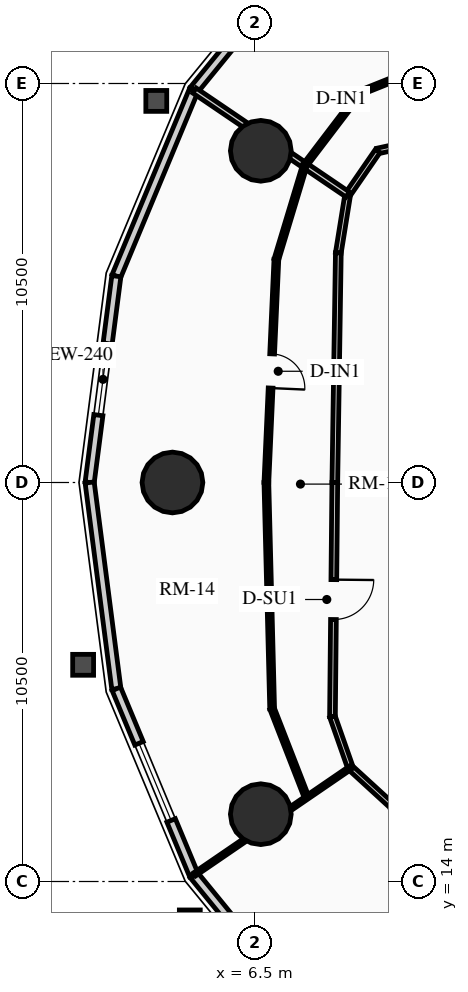
"""IFC4 building model, lengths in metres.
Left out: names, types, materials, properties, quantities, classifications, styles, units other than length and angle.
Written with IfcOpenShell. Run it as: python <this file> out.ifc"""

import sys

from ifc_helpers import new_model, si_unit, direction, frame, frame_2d, origin, origin_2d, place, context, subcontext, project, spatial, rectangle, circle, extrude, source, transform, mapped, element, fill, save


model = new_model("IFC4")
c1 = context("Model", 3, precision=1e-05, world=origin(), true_north=direction((0.0, 1.0)))
c2 = subcontext(c1, "Body", "Model", "MODEL_VIEW")
j1 = project(units=[si_unit("LENGTHUNIT", "METRE"), si_unit("PLANEANGLEUNIT", "RADIAN")], contexts=[c1])
p1 = place(None, origin())
s1 = spatial("IfcSite", under=j1, at=p1, CompositionType="ELEMENT")
p2 = place(p1, origin())
s2 = spatial("IfcBuilding", under=s1, at=p2, CompositionType="ELEMENT")
p3 = place(p2, frame((0.0, 0.0, 27.82)))
s3 = spatial("IfcBuildingStorey", under=s2, at=p3, CompositionType="ELEMENT", Elevation=27.82)
for number, where, z_axis, x_axis in (
    (1, (6.653, 33.229, 0.0), (0.0, 0.0, 1.0), (1.0, 0.0, 0.0)),
    (2, (4.328, 24.5, 0.0), (0.0, 0.0, 1.0), (1.0, 0.0, 0.0)),
    (3, (6.653, 15.771, 0.0), (0.0, 0.0, 1.0), (1.0, 0.0, 0.0)),
):
    element("IfcColumn", number, at=place(p3, frame(where, z_axis=z_axis, x_axis=x_axis)), inside=s3, PredefinedType="USERDEFINED", context=c2, shape_type="SweptSolid", body=[
        extrude(circle(Radius=0.8, at=origin_2d()), origin(), (0.0, 0.0, 1.0), 2.91),
    ])
p4 = place(p3, frame((4.89, 34.827, 0.0), z_axis=(0.0, 0.0, 1.0), x_axis=(0.632588557044, 0.774488035735, 0.0)))
e4 = element("IfcWall", 4, at=p4, inside=s3, PredefinedType="SOLIDWALL", context=c2, shape_type="SweptSolid", body=[
    extrude(rectangle(XDim=5.019, YDim=0.24, at=frame_2d((2.509, 0.0))), origin(), (0.0, 0.0, 1.0), 2.635),
])
m1 = source(origin(), c2, "Body", "SweptSolid", [
    extrude(rectangle(XDim=1.9, YDim=1.35, at=frame_2d((0.95, 0.675))), frame((0.0, 0.13, 0.0), z_axis=(0.0, -1.0, 0.0), x_axis=(1.0, 0.0, 0.0)), (0.0, 0.0, 1.0), 0.26),
])
p5 = place(p4, frame((1.559, 0.0, 0.65)))
e5 = element("IfcOpeningElement", 5, at=p5, cuts=e4, PredefinedType="OPENING", context=c2, shape_type="MappedRepresentation", body=[
    mapped(m1, transform((0.0, 0.0, 0.0), x_axis=(1.0, 0.0, 0.0), y_axis=(0.0, 1.0, 0.0), z_axis=(0.0, 0.0, 1.0), scale=1.0)),
])
p6 = place(p3, frame((2.851, 29.929, 0.0), z_axis=(0.0, 0.0, 1.0), x_axis=(0.384255919668, 0.923226618009, 0.0)))
e6 = element("IfcWall", 6, at=p6, inside=s3, PredefinedType="SOLIDWALL", context=c2, shape_type="SweptSolid", body=[
    extrude(rectangle(XDim=5.305, YDim=0.24, at=frame_2d((2.653, 0.0))), origin(), (0.0, 0.0, 1.0), 2.635),
])
p7 = place(p3, frame((2.149, 24.5, 0.0), z_axis=(0.0, 0.0, 1.0), x_axis=(0.128298189174, 0.991735637483, 0.0)))
e7 = element("IfcWall", 7, at=p7, inside=s3, PredefinedType="SOLIDWALL", context=c2, shape_type="SweptSolid", body=[
    extrude(rectangle(XDim=5.475, YDim=0.24, at=frame_2d((2.737, 0.0))), origin(), (0.0, 0.0, 1.0), 2.073),
])
p8 = place(p7, frame((1.787, 0.0, 0.65)))
e8 = element("IfcOpeningElement", 8, at=p8, cuts=e7, PredefinedType="OPENING", context=c2, shape_type="MappedRepresentation", body=[
    mapped(m1, transform((0.0, 0.0, 0.0), x_axis=(1.0, 0.0, 0.0), y_axis=(0.0, 1.0, 0.0), z_axis=(0.0, 0.0, 1.0), scale=1.0)),
])
p9 = place(p3, frame((2.851, 19.071, 0.0), z_axis=(0.0, 0.0, 1.0), x_axis=(-0.128298189174, 0.991735637483, 0.0)))
e9 = element("IfcWall", 9, at=p9, inside=s3, PredefinedType="SOLIDWALL", context=c2, shape_type="SweptSolid", body=[
    extrude(rectangle(XDim=5.475, YDim=0.24, at=frame_2d((2.737, 0.0))), origin(), (0.0, 0.0, 1.0), 2.073),
])
p10 = place(p3, frame((4.89, 14.173, 0.0), z_axis=(0.0, 0.0, 1.0), x_axis=(-0.384255919668, 0.923226618009, 0.0)))
e10 = element("IfcWall", 10, at=p10, inside=s3, PredefinedType="SOLIDWALL", context=c2, shape_type="SweptSolid", body=[
    extrude(rectangle(XDim=5.305, YDim=0.24, at=frame_2d((2.653, 0.0))), origin(), (0.0, 0.0, 1.0), 2.635),
])
m2 = source(origin(), c2, "Body", "SweptSolid", [
    extrude(rectangle(XDim=2.2, YDim=1.35, at=frame_2d((1.1, 0.675))), frame((0.0, 0.13, 0.0), z_axis=(0.0, -1.0, 0.0), x_axis=(1.0, 0.0, 0.0)), (0.0, 0.0, 1.0), 0.26),
])
p11 = place(p10, frame((1.553, 0.0, 0.65)))
e11 = element("IfcOpeningElement", 11, at=p11, cuts=e10, PredefinedType="OPENING", context=c2, shape_type="MappedRepresentation", body=[
    mapped(m2, transform((0.0, 0.0, 0.0), x_axis=(1.0, 0.0, 0.0), y_axis=(0.0, 1.0, 0.0), z_axis=(0.0, 0.0, 1.0), scale=1.0)),
])
p12 = place(p3, frame((8.065, 10.286, 0.0), z_axis=(0.0, 0.0, 1.0), x_axis=(-0.632588557044, 0.774488035735, 0.0)))
e12 = element("IfcWall", 12, at=p12, inside=s3, PredefinedType="SOLIDWALL", context=c2, shape_type="SweptSolid", body=[
    extrude(rectangle(XDim=5.019, YDim=0.24, at=frame_2d((2.509, 0.0))), origin(), (0.0, 0.0, 1.0), 2.635),
])
p13 = place(p3, frame((11.62, 33.637, 0.0), z_axis=(0.0, 0.0, 1.0), x_axis=(-0.97702579435, -0.213121085711, 0.0)))
e13 = element("IfcWall", 13, at=p13, inside=s3, PredefinedType="PARTITIONING", context=c2, shape_type="SweptSolid", body=[
    extrude(rectangle(XDim=1.935, YDim=0.15, at=frame_2d((0.967, 0.0))), origin(), (0.0, 0.0, 1.0), 2.159),
])
m3 = source(origin(), c2, "Body", "SweptSolid", [
    extrude(rectangle(XDim=1.05, YDim=2.015, at=frame_2d((0.525, 1.007))), frame((0.0, 0.085, 0.0), z_axis=(0.0, -1.0, 0.0), x_axis=(1.0, 0.0, 0.0)), (0.0, 0.0, 1.0), 0.17),
])
p14 = place(p13, frame((0.442, 0.0, 0.0)))
e14 = element("IfcOpeningElement", 14, at=p14, cuts=e13, PredefinedType="OPENING", context=c2, shape_type="MappedRepresentation", body=[
    mapped(m3, transform((0.0, 0.0, 0.0), x_axis=(1.0, 0.0, 0.0), y_axis=(0.0, 1.0, 0.0), z_axis=(0.0, 0.0, 1.0), scale=1.0)),
])
p15 = place(p3, frame((9.729, 33.225, 0.0), z_axis=(0.0, 0.0, 1.0), x_axis=(-0.567183649484, -0.82359134755, 0.0)))
e15 = element("IfcWall", 15, at=p15, inside=s3, PredefinedType="PARTITIONING", context=c2, shape_type="SweptSolid", body=[
    extrude(rectangle(XDim=1.392, YDim=0.15, at=frame_2d((0.696, 0.0))), origin(), (0.0, 0.0, 1.0), 2.159),
])
p16 = place(p3, frame((8.94, 32.078, 0.0), z_axis=(0.0, 0.0, 1.0), x_axis=(-0.159148467753, -0.98725466077, 0.0)))
e16 = element("IfcWall", 16, at=p16, inside=s3, PredefinedType="PARTITIONING", context=c2, shape_type="SweptSolid", body=[
    extrude(rectangle(XDim=1.554, YDim=0.15, at=frame_2d((0.777, 0.0))), origin(), (0.0, 0.0, 1.0), 2.205),
])
p17 = place(p3, frame((8.693, 30.544, 0.0), z_axis=(0.0, 0.0, 1.0), x_axis=(-0.015307007986, -0.99988284089, 0.0)))
e17 = element("IfcWall", 17, at=p17, inside=s3, PredefinedType="PARTITIONING", context=c2, shape_type="SweptSolid", body=[
    extrude(rectangle(XDim=6.045, YDim=0.15, at=frame_2d((3.022, 0.0))), origin(), (0.0, 0.0, 1.0), 2.635),
])
p18 = place(p3, frame((8.6, 24.5, 0.0), z_axis=(0.0, 0.0, 1.0), x_axis=(-0.010023665349, -0.999949761805, 0.0)))
e18 = element("IfcWall", 18, at=p18, inside=s3, PredefinedType="PARTITIONING", context=c2, shape_type="SweptSolid", body=[
    extrude(rectangle(XDim=6.162, YDim=0.15, at=frame_2d((3.081, 0.0))), origin(), (0.0, 0.0, 1.0), 2.159),
])
p19 = place(p18, frame((2.556, 0.0, 0.0)))
e19 = element("IfcOpeningElement", 19, at=p19, cuts=e18, PredefinedType="OPENING", context=c2, shape_type="MappedRepresentation", body=[
    mapped(m3, transform((0.0, 0.0, 0.0), x_axis=(1.0, 0.0, 0.0), y_axis=(0.0, 1.0, 0.0), z_axis=(0.0, 0.0, 1.0), scale=1.0)),
])
p20 = place(p3, frame((8.538, 18.338, 0.0), z_axis=(0.0, 0.0, 1.0), x_axis=(0.331358150167, -0.94350504838, 0.0)))
e20 = element("IfcWall", 20, at=p20, inside=s3, PredefinedType="PARTITIONING", context=c2, shape_type="SweptSolid", body=[
    extrude(rectangle(XDim=1.424, YDim=0.15, at=frame_2d((0.712, 0.0))), origin(), (0.0, 0.0, 1.0), 2.205),
])
p21 = place(p3, frame((9.01, 16.994, 0.0), z_axis=(0.0, 0.0, 1.0), x_axis=(0.737701798986, -0.67512669609, 0.0)))
e21 = element("IfcWall", 21, at=p21, inside=s3, PredefinedType="PARTITIONING", context=c2, shape_type="SweptSolid", body=[
    extrude(rectangle(XDim=1.498, YDim=0.15, at=frame_2d((0.749, 0.0))), origin(), (0.0, 0.0, 1.0), 2.159),
])
p22 = place(p3, frame((8.94, 32.078, 0.0), z_axis=(0.0, 0.0, 1.0), x_axis=(-0.827476605417, 0.561500193666, 0.0)))
e22 = element("IfcWall", 22, at=p22, inside=s3, PredefinedType="PARTITIONING", context=c2, shape_type="SweptSolid", body=[
    extrude(rectangle(XDim=4.875, YDim=0.16, at=frame_2d((2.438, 0.0))), origin(), (0.0, 0.0, 1.0), 2.073),
])
p23 = place(p3, frame((9.01, 16.994, 0.0), z_axis=(0.0, 0.0, 1.0), x_axis=(-0.825130244962, -0.564942544733, 0.0)))
e23 = element("IfcWall", 23, at=p23, inside=s3, PredefinedType="MOVABLE", context=c2, shape_type="SweptSolid", body=[
    extrude(rectangle(XDim=4.974, YDim=0.1, at=frame_2d((2.487, 0.0))), origin(), (0.0, 0.0, 1.0), 2.073),
])
p24 = place(p3, frame((11.746, 35.752, 0.0), z_axis=(0.0, 0.0, 1.0), x_axis=(-0.928091790064, -0.372351486119, 0.0)))
e24 = element("IfcWall", 24, at=p24, inside=s3, PredefinedType="PARTITIONING", context=c2, shape_type="SweptSolid", body=[
    extrude(rectangle(XDim=2.672, YDim=0.125, at=frame_2d((1.336, 0.0))), origin(), (0.0, 0.0, 1.0), 2.205),
])
m4 = source(origin(), c2, "Body", "SweptSolid", [
    extrude(rectangle(XDim=0.9, YDim=2.005, at=frame_2d((0.45, 1.002))), frame((0.0, 0.073, 0.0), z_axis=(0.0, -1.0, 0.0), x_axis=(1.0, 0.0, 0.0)), (0.0, 0.0, 1.0), 0.145),
])
p25 = place(p24, frame((0.886, 0.0, 0.0)))
e25 = element("IfcOpeningElement", 25, at=p25, cuts=e24, PredefinedType="OPENING", context=c2, shape_type="MappedRepresentation", body=[
    mapped(m4, transform((0.0, 0.0, 0.0), x_axis=(1.0, 0.0, 0.0), y_axis=(0.0, 1.0, 0.0), z_axis=(0.0, 0.0, 1.0), scale=1.0)),
])
p26 = place(p3, frame((9.267, 34.757, 0.0), z_axis=(0.0, 0.0, 1.0), x_axis=(-0.60573716219, -0.795664810295, 0.0)))
e26 = element("IfcWall", 26, at=p26, inside=s3, PredefinedType="PARTITIONING", context=c2, shape_type="SweptSolid", body=[
    extrude(rectangle(XDim=2.404, YDim=0.125, at=frame_2d((1.202, 0.0))), origin(), (0.0, 0.0, 1.0), 2.159),
])
p27 = place(p3, frame((7.811, 32.845, 0.0), z_axis=(0.0, 0.0, 1.0), x_axis=(-0.289357304294, -0.957221160679, 0.0)))
e27 = element("IfcWall", 27, at=p27, inside=s3, PredefinedType="PARTITIONING", context=c2, shape_type="SweptSolid", body=[
    extrude(rectangle(XDim=2.585, YDim=0.125, at=frame_2d((1.292, 0.0))), origin(), (0.0, 0.0, 1.0), 2.159),
])
p28 = place(p3, frame((7.062, 30.37, 0.0), z_axis=(0.0, 0.0, 1.0), x_axis=(-0.044789476409, -0.998996447843, 0.0)))
e28 = element("IfcWall", 28, at=p28, inside=s3, PredefinedType="PARTITIONING", context=c2, shape_type="SweptSolid", body=[
    extrude(rectangle(XDim=5.876, YDim=0.125, at=frame_2d((2.938, 0.0))), origin(), (0.0, 0.0, 1.0), 2.635),
])
p29 = place(p28, frame((2.488, 0.0, 0.0)))
e29 = element("IfcOpeningElement", 29, at=p29, cuts=e28, PredefinedType="OPENING", context=c2, shape_type="MappedRepresentation", body=[
    mapped(m4, transform((0.0, 0.0, 0.0), x_axis=(1.0, 0.0, 0.0), y_axis=(0.0, 1.0, 0.0), z_axis=(0.0, 0.0, 1.0), scale=1.0)),
])
p30 = place(p3, frame((6.799, 24.5, 0.0), z_axis=(0.0, 0.0, 1.0), x_axis=(0.02553283421, -0.999673984045, 0.0)))
e30 = element("IfcWall", 30, at=p30, inside=s3, PredefinedType="PARTITIONING", context=c2, shape_type="SweptSolid", body=[
    extrude(rectangle(XDim=5.957, YDim=0.125, at=frame_2d((2.979, 0.0))), origin(), (0.0, 0.0, 1.0), 2.159),
])
p31 = place(p3, frame((6.951, 18.545, 0.0), z_axis=(0.0, 0.0, 1.0), x_axis=(0.362681113276, -0.931913306093, 0.0)))
e31 = element("IfcWall", 31, at=p31, inside=s3, PredefinedType="PARTITIONING", context=c2, shape_type="SweptSolid", body=[
    extrude(rectangle(XDim=2.508, YDim=0.125, at=frame_2d((1.254, 0.0))), origin(), (0.0, 0.0, 1.0), 2.159),
])
m5 = source(origin(), c2, "Body", "SweptSolid", [
    extrude(rectangle(XDim=1.9, YDim=1.35, at=frame_2d((0.95, 0.675))), frame((0.0, 0.03, 0.0), z_axis=(0.0, -1.0, 0.0), x_axis=(1.0, 0.0, 0.0)), (0.0, 0.0, 1.0), 0.06),
])
p32 = place(p8, origin())
e32 = element("IfcWindow", 32, at=p32, inside=s3, PartitioningType="DOUBLE_PANEL_VERTICAL", PredefinedType="WINDOW", context=c2, shape_type="MappedRepresentation", body=[
    mapped(m5, transform((0.0, 0.0, 0.0), x_axis=(1.0, 0.0, 0.0), y_axis=(0.0, 1.0, 0.0), z_axis=(0.0, 0.0, 1.0), scale=1.0)),
])
fill(e8, e32)
m6 = source(origin(), c2, "Body", "SweptSolid", [
    extrude(rectangle(XDim=2.2, YDim=1.35, at=frame_2d((1.1, 0.675))), frame((0.0, 0.03, 0.0), z_axis=(0.0, -1.0, 0.0), x_axis=(1.0, 0.0, 0.0)), (0.0, 0.0, 1.0), 0.06),
])
p33 = place(p11, origin())
e33 = element("IfcWindow", 33, at=p33, inside=s3, PartitioningType="DOUBLE_PANEL_VERTICAL", PredefinedType="WINDOW", context=c2, shape_type="MappedRepresentation", body=[
    mapped(m6, transform((0.0, 0.0, 0.0), x_axis=(1.0, 0.0, 0.0), y_axis=(0.0, 1.0, 0.0), z_axis=(0.0, 0.0, 1.0), scale=1.0)),
])
fill(e11, e33)
m7 = source(origin(), c2, "Body", "SweptSolid", [
    extrude(rectangle(XDim=1.05, YDim=2.015, at=frame_2d((0.525, 1.007))), frame((0.0, 0.025, 0.0), z_axis=(0.0, -1.0, 0.0), x_axis=(1.0, 0.0, 0.0)), (0.0, 0.0, 1.0), 0.05),
])
p34 = place(p19, origin())
e34 = element("IfcDoor", 34, at=p34, inside=s3, OperationType="SINGLE_SWING_LEFT", PredefinedType="DOOR", context=c2, shape_type="MappedRepresentation", body=[
    mapped(m7, transform((0.0, 0.0, 0.0), x_axis=(1.0, 0.0, 0.0), y_axis=(0.0, 1.0, 0.0), z_axis=(0.0, 0.0, 1.0), scale=1.0)),
])
fill(e19, e34)
m8 = source(origin(), c2, "Body", "SweptSolid", [
    extrude(rectangle(XDim=0.9, YDim=2.005, at=frame_2d((0.45, 1.002))), frame((0.0, 0.025, 0.0), z_axis=(0.0, -1.0, 0.0), x_axis=(1.0, 0.0, 0.0)), (0.0, 0.0, 1.0), 0.05),
])
p35 = place(p29, origin())
e35 = element("IfcDoor", 35, at=p35, inside=s3, OperationType="SINGLE_SWING_RIGHT", PredefinedType="DOOR", context=c2, shape_type="MappedRepresentation", body=[
    mapped(m8, transform((0.0, 0.0, 0.0), x_axis=(1.0, 0.0, 0.0), y_axis=(0.0, 1.0, 0.0), z_axis=(0.0, 0.0, 1.0), scale=1.0)),
])
fill(e29, e35)
save(model, sys.argv[1])
